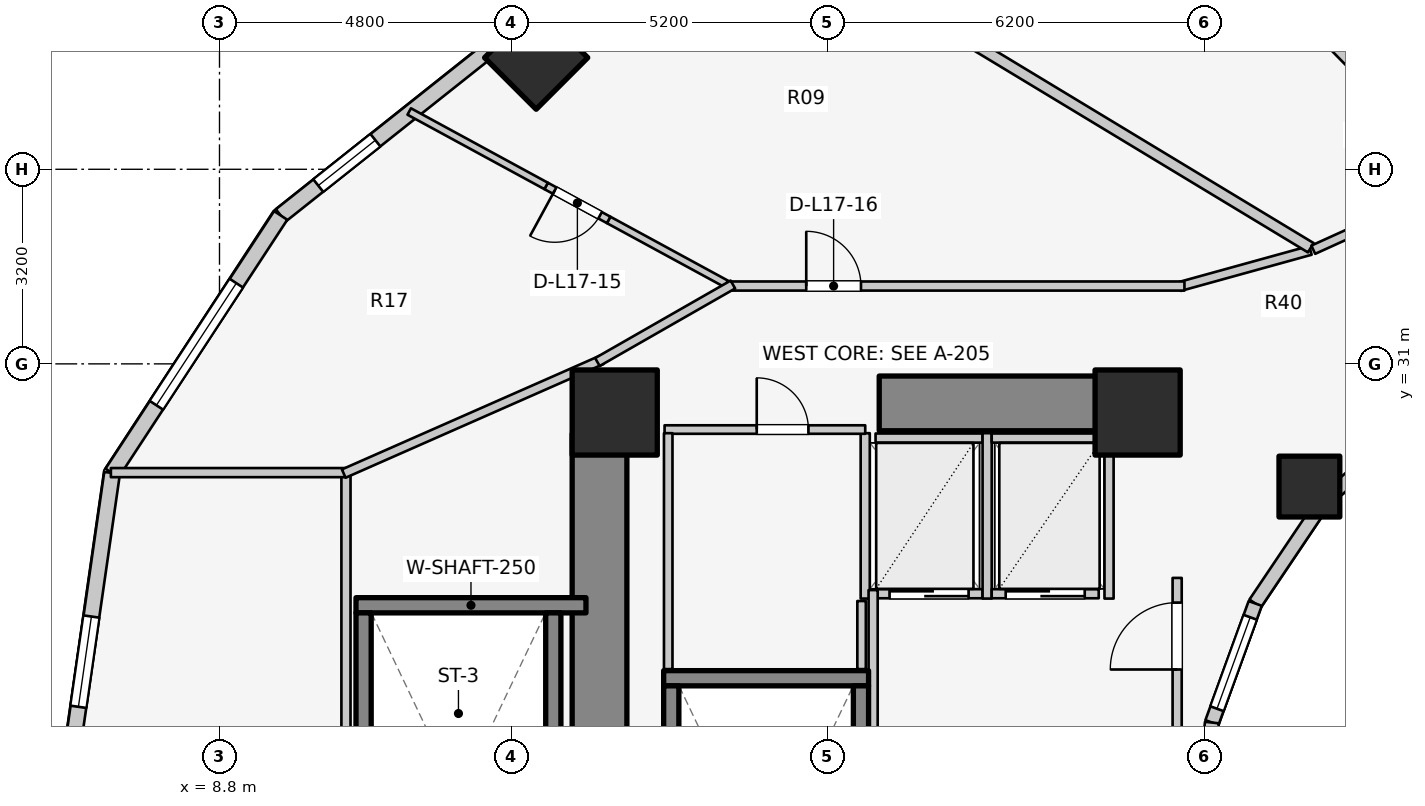
"""IFC4 building model, lengths in metres.
Left out: names, types, materials, properties, quantities, classifications, styles, units other than length and angle.
Written with IfcOpenShell. Run it as: python <this file> out.ifc"""

import sys

from ifc_helpers import new_model, si_unit, direction, frame, frame_2d, origin, origin_2d, place, context, subcontext, project, spatial, rectangle, extrude, element, fill, save


model = new_model("IFC4")
c1 = context("Model", 3, precision=1e-05, world=origin(), true_north=direction((0.0, 1.0)))
c2 = subcontext(c1, "Body", "Model", "MODEL_VIEW")
j1 = project(units=[si_unit("LENGTHUNIT", "METRE"), si_unit("PLANEANGLEUNIT", "RADIAN")], contexts=[c1])
p1 = place(None, origin())
s1 = spatial("IfcSite", under=j1, at=p1, CompositionType="ELEMENT")
p2 = place(p1, origin())
s2 = spatial("IfcBuilding", under=s1, at=p2, CompositionType="ELEMENT")
p3 = place(p2, frame((0.0, 0.0, 58.6)))
s3 = spatial("IfcBuildingStorey", under=s2, at=p3, CompositionType="ELEMENT", Elevation=58.6)
p4 = place(p3, frame((15.05, 17.05, 0.0), z_axis=(0.0, 0.0, 1.0), x_axis=(0.0, 1.0, 0.0)))
e1 = element("IfcWall", 1, at=p4, inside=s3, PredefinedType="SHEAR", context=c2, shape_type="SweptSolid", body=[
    extrude(rectangle(XDim=12.8, YDim=0.9, at=frame_2d((6.4, 0.0))), origin(), (0.0, 0.0, 1.0), 3.1),
])
p5 = place(p3, frame((19.65, 30.35, 0.0), z_axis=(0.0, 0.0, 1.0), x_axis=(1.0, 0.0, 0.0)))
e2 = element("IfcWall", 2, at=p5, inside=s3, PredefinedType="SHEAR", context=c2, shape_type="SweptSolid", body=[
    extrude(rectangle(XDim=4.5, YDim=0.9, at=frame_2d((2.25, 0.0))), origin(), (0.0, 0.0, 1.0), 3.1),
])
p6 = place(p3, frame((16.105, 25.83, 0.0), z_axis=(0.0, 0.0, 1.0), x_axis=(1.0, 0.0, 0.0)))
e3 = element("IfcWall", 3, at=p6, inside=s3, PredefinedType="SOLIDWALL", context=c2, shape_type="SweptSolid", body=[
    extrude(rectangle(XDim=3.37, YDim=0.25, at=frame_2d((1.685, 0.0))), origin(), (0.0, 0.0, 1.0), 3.1),
])
for number, where, z_axis, x_axis in (
    (4, (16.23, 17.895, 0.0), (0.0, 0.0, 1.0), (0.0, 1.0, 0.0)),
    (5, (19.35, 17.895, 0.0), (0.0, 0.0, 1.0), (0.0, 1.0, 0.0)),
):
    element("IfcWall", number, at=place(p3, frame(where, z_axis=z_axis, x_axis=x_axis)), inside=s3, PredefinedType="SOLIDWALL", context=c2, shape_type="SweptSolid", body=[
        extrude(rectangle(XDim=7.81, YDim=0.25, at=frame_2d((3.905, 0.0))), origin(), (0.0, 0.0, 1.0), 3.1),
    ])
p7 = place(p3, frame((11.045, 27.03, 0.0), z_axis=(0.0, 0.0, 1.0), x_axis=(1.0, 0.0, 0.0)))
e6 = element("IfcWall", 6, at=p7, inside=s3, PredefinedType="SOLIDWALL", context=c2, shape_type="SweptSolid", body=[
    extrude(rectangle(XDim=3.782, YDim=0.25, at=frame_2d((1.891, 0.0))), origin(), (0.0, 0.0, 1.0), 3.1),
])
for number, where, z_axis, x_axis in (
    (7, (11.17, 19.095, 0.0), (0.0, 0.0, 1.0), (0.0, 1.0, 0.0)),
    (8, (14.29, 19.095, 0.0), (0.0, 0.0, 1.0), (0.0, 1.0, 0.0)),
):
    element("IfcWall", number, at=place(p3, frame(where, z_axis=z_axis, x_axis=x_axis)), inside=s3, PredefinedType="SOLIDWALL", context=c2, shape_type="SweptSolid", body=[
        extrude(rectangle(XDim=7.81, YDim=0.25, at=frame_2d((3.905, 0.0))), origin(), (0.0, 0.0, 1.0), 3.1),
    ])
for number, where, z_axis, x_axis in (
    (9, (23.9, 30.2, 0.0), (0.0, 0.0, 1.0), (1.0, 0.0, 0.0)),
    (10, (15.3, 30.2, 0.0), (0.0, 0.0, 1.0), (1.0, 0.0, 0.0)),
):
    element("IfcColumn", number, at=place(p3, frame(where, z_axis=z_axis, x_axis=x_axis)), inside=s3, PredefinedType="COLUMN", context=c2, shape_type="SweptSolid", body=[
        extrude(rectangle(XDim=1.4, YDim=1.4, at=origin_2d()), origin(), (0.0, 0.0, 1.0), 3.1),
    ])
p8 = place(p3, frame((26.725, 28.982, 0.0), z_axis=(0.0, 0.0, 1.0), x_axis=(1.0, 0.0, 0.0)))
e11 = element("IfcColumn", 11, at=p8, inside=s3, PredefinedType="COLUMN", context=c2, shape_type="SweptSolid", body=[
    extrude(rectangle(XDim=1.0, YDim=1.0, at=origin_2d()), origin(), (0.0, 0.0, 1.0), 3.1),
])
p9 = place(p3, frame((14.008, 36.035, 0.0), z_axis=(0.0, 0.0, 1.0), x_axis=(-0.707106781187, 0.707106781187, 0.0)))
e12 = element("IfcColumn", 12, at=p9, inside=s3, PredefinedType="COLUMN", context=c2, shape_type="SweptSolid", body=[
    extrude(rectangle(XDim=1.2, YDim=1.2, at=origin_2d()), origin(), (0.0, 0.0, 1.0), 3.1),
])
p10 = place(p3, frame((28.44, 30.032, 0.0), z_axis=(0.0, 0.0, 1.0), x_axis=(-0.752576694707, -0.658504607869, 0.0)))
e13 = element("IfcWall", 13, at=p10, inside=s3, PredefinedType="STANDARD", context=c2, shape_type="SweptSolid", body=[
    extrude(rectangle(XDim=1.959, YDim=0.23, at=frame_2d((0.98, 0.0))), origin(), (0.0, 0.0, 1.0), 2.16),
])
p11 = place(p3, frame((26.965, 28.742, 0.0), z_axis=(0.0, 0.0, 1.0), x_axis=(-0.558197800898, -0.829707909492, 0.0)))
e14 = element("IfcWall", 14, at=p11, inside=s3, PredefinedType="STANDARD", context=c2, shape_type="SweptSolid", body=[
    extrude(rectangle(XDim=2.027, YDim=0.23, at=frame_2d((1.013, 0.0))), origin(), (0.0, 0.0, 1.0), 2.16),
])
p12 = place(p3, frame((25.834, 27.06, 0.0), z_axis=(0.0, 0.0, 1.0), x_axis=(-0.341423187295, -0.93990968033, 0.0)))
e15 = element("IfcWall", 15, at=p12, inside=s3, PredefinedType="STANDARD", context=c2, shape_type="SweptSolid", body=[
    extrude(rectangle(XDim=2.084, YDim=0.23, at=frame_2d((1.042, 0.0))), origin(), (0.0, 0.0, 1.0), 2.84),
])
p13 = place(p12, frame((0.242, 0.0, 0.85)))
e16 = element("IfcOpeningElement", 16, at=p13, cuts=e15, PredefinedType="OPENING", context=c2, shape_type="SweptSolid", body=[
    extrude(rectangle(XDim=1.6, YDim=1.65, at=frame_2d((0.8, 0.825))), frame((0.0, 0.125, 0.0), z_axis=(0.0, -1.0, 0.0), x_axis=(1.0, 0.0, 0.0)), (0.0, 0.0, 1.0), 0.25),
])
p14 = place(p3, frame((25.123, 25.102, 0.0), z_axis=(0.0, 0.0, 1.0), x_axis=(-0.114711713601, -0.993398823617, 0.0)))
e17 = element("IfcWall", 17, at=p14, inside=s3, PredefinedType="STANDARD", context=c2, shape_type="SweptSolid", body=[
    extrude(rectangle(XDim=2.115, YDim=0.23, at=frame_2d((1.058, 0.0))), origin(), (0.0, 0.0, 1.0), 2.84),
])
p15 = place(p3, frame((13.595, 36.45, 0.0), z_axis=(0.0, 0.0, 1.0), x_axis=(-0.783123133379, -0.621866672179, 0.0)))
e18 = element("IfcWall", 18, at=p15, inside=s3, PredefinedType="STANDARD", context=c2, shape_type="SweptSolid", body=[
    extrude(rectangle(XDim=4.839, YDim=0.26, at=frame_2d((2.419, 0.0))), origin(), (0.0, 0.0, 1.0), 2.85),
])
p16 = place(p15, frame((2.849, 0.0, 0.75)))
e19 = element("IfcOpeningElement", 19, at=p16, cuts=e18, PredefinedType="OPENING", context=c2, shape_type="SweptSolid", body=[
    extrude(rectangle(XDim=1.2, YDim=1.5, at=frame_2d((0.6, 0.75))), frame((0.0, 0.14, 0.0), z_axis=(0.0, -1.0, 0.0), x_axis=(1.0, 0.0, 0.0)), (0.0, 0.0, 1.0), 0.28),
])
p17 = place(p3, frame((9.806, 33.441, 0.0), z_axis=(0.0, 0.0, 1.0), x_axis=(-0.547702757047, -0.836672988642, 0.0)))
e20 = element("IfcWall", 20, at=p17, inside=s3, PredefinedType="STANDARD", context=c2, shape_type="SweptSolid", body=[
    extrude(rectangle(XDim=5.062, YDim=0.26, at=frame_2d((2.531, 0.0))), origin(), (0.0, 0.0, 1.0), 2.85),
])
p18 = place(p17, frame((1.331, 0.0, 0.75)))
e21 = element("IfcOpeningElement", 21, at=p18, cuts=e20, PredefinedType="OPENING", context=c2, shape_type="SweptSolid", body=[
    extrude(rectangle(XDim=2.4, YDim=1.7, at=frame_2d((1.2, 0.85))), frame((0.0, 0.14, 0.0), z_axis=(0.0, -1.0, 0.0), x_axis=(1.0, 0.0, 0.0)), (0.0, 0.0, 1.0), 0.28),
])
p19 = place(p3, frame((7.033, 29.205, 0.0), z_axis=(0.0, 0.0, 1.0), x_axis=(-0.142528001686, -0.989790770181, 0.0)))
e22 = element("IfcWall", 22, at=p19, inside=s3, PredefinedType="STANDARD", context=c2, shape_type="SweptSolid", body=[
    extrude(rectangle(XDim=6.269, YDim=0.26, at=frame_2d((3.135, 0.0))), origin(), (0.0, 0.0, 1.0), 2.85),
])
p20 = place(p19, frame((2.385, 0.0, 0.75)))
e23 = element("IfcOpeningElement", 23, at=p20, cuts=e22, PredefinedType="OPENING", context=c2, shape_type="SweptSolid", body=[
    extrude(rectangle(XDim=1.5, YDim=1.6, at=frame_2d((0.75, 0.8))), frame((0.0, 0.14, 0.0), z_axis=(0.0, -1.0, 0.0), x_axis=(1.0, 0.0, 0.0)), (0.0, 0.0, 1.0), 0.28),
])
p21 = place(p3, frame((19.59, 27.22, 0.0), z_axis=(0.0, 0.0, 1.0), x_axis=(1.0, 0.0, 0.0)))
e24 = element("IfcWall", 24, at=p21, inside=s3, PredefinedType="SOLIDWALL", context=c2, shape_type="SweptSolid", body=[
    extrude(rectangle(XDim=1.76, YDim=0.15, at=frame_2d((0.88, 0.0))), origin(), (0.0, 0.0, 1.0), 2.855),
])
p22 = place(p21, frame((0.23, 0.0, 0.0)))
e25 = element("IfcOpeningElement", 25, at=p22, cuts=e24, PredefinedType="OPENING", context=c2, shape_type="SweptSolid", body=[
    extrude(rectangle(XDim=1.3, YDim=2.1, at=frame_2d((0.65, 1.05))), frame((0.0, 0.085, 0.0), z_axis=(0.0, -1.0, 0.0), x_axis=(1.0, 0.0, 0.0)), (0.0, 0.0, 1.0), 0.17),
])
p23 = place(p3, frame((19.59, 29.78, 0.0), z_axis=(0.0, 0.0, 1.0), x_axis=(1.0, 0.0, 0.0)))
e26 = element("IfcWall", 26, at=p23, inside=s3, PredefinedType="SOLIDWALL", context=c2, shape_type="SweptSolid", body=[
    extrude(rectangle(XDim=1.76, YDim=0.15, at=frame_2d((0.88, 0.0))), origin(), (0.0, 0.0, 1.0), 2.855),
])
for number, where, z_axis, x_axis in (
    (27, (19.42, 27.14, 0.0), (0.0, 0.0, 1.0), (0.0, 1.0, 0.0)),
    (28, (21.425, 27.14, 0.0), (0.0, 0.0, 1.0), (0.0, 1.0, 0.0)),
):
    element("IfcWall", number, at=place(p3, frame(where, z_axis=z_axis, x_axis=x_axis)), inside=s3, PredefinedType="SOLIDWALL", context=c2, shape_type="SweptSolid", body=[
        extrude(rectangle(XDim=2.72, YDim=0.15, at=frame_2d((1.36, 0.0))), origin(), (0.0, 0.0, 1.0), 2.855),
    ])
p24 = place(p3, frame((21.5, 27.22, 0.0), z_axis=(0.0, 0.0, 1.0), x_axis=(1.0, 0.0, 0.0)))
e29 = element("IfcWall", 29, at=p24, inside=s3, PredefinedType="SOLIDWALL", context=c2, shape_type="SweptSolid", body=[
    extrude(rectangle(XDim=1.76, YDim=0.15, at=frame_2d((0.88, 0.0))), origin(), (0.0, 0.0, 1.0), 2.855),
])
p25 = place(p24, frame((0.23, 0.0, 0.0)))
e30 = element("IfcOpeningElement", 30, at=p25, cuts=e29, PredefinedType="OPENING", context=c2, shape_type="SweptSolid", body=[
    extrude(rectangle(XDim=1.3, YDim=2.1, at=frame_2d((0.65, 1.05))), frame((0.0, 0.085, 0.0), z_axis=(0.0, -1.0, 0.0), x_axis=(1.0, 0.0, 0.0)), (0.0, 0.0, 1.0), 0.17),
])
p26 = place(p3, frame((21.5, 29.78, 0.0), z_axis=(0.0, 0.0, 1.0), x_axis=(1.0, 0.0, 0.0)))
e31 = element("IfcWall", 31, at=p26, inside=s3, PredefinedType="SOLIDWALL", context=c2, shape_type="SweptSolid", body=[
    extrude(rectangle(XDim=1.76, YDim=0.15, at=frame_2d((0.88, 0.0))), origin(), (0.0, 0.0, 1.0), 2.855),
])
p27 = place(p3, frame((23.43, 27.14, 0.0), z_axis=(0.0, 0.0, 1.0), x_axis=(0.0, 1.0, 0.0)))
e32 = element("IfcWall", 32, at=p27, inside=s3, PredefinedType="SOLIDWALL", context=c2, shape_type="SweptSolid", body=[
    extrude(rectangle(XDim=2.72, YDim=0.15, at=frame_2d((1.36, 0.0))), origin(), (0.0, 0.0, 1.0), 2.855),
])
p28 = place(p3, frame((19.55, 24.08, 0.0), z_axis=(0.0, 0.0, 1.0), x_axis=(0.0, 1.0, 0.0)))
e33 = element("IfcWall", 33, at=p28, inside=s3, PredefinedType="PARTITIONING", context=c2, shape_type="SweptSolid", body=[
    extrude(rectangle(XDim=3.2, YDim=0.15, at=frame_2d((1.6, 0.0))), origin(), (0.0, 0.0, 1.0), 2.855),
])
p29 = place(p3, frame((24.55, 24.08, 0.0), z_axis=(0.0, 0.0, 1.0), x_axis=(0.0, 1.0, 0.0)))
e34 = element("IfcWall", 34, at=p29, inside=s3, PredefinedType="PARTITIONING", context=c2, shape_type="SweptSolid", body=[
    extrude(rectangle(XDim=3.4, YDim=0.15, at=frame_2d((1.7, 0.0))), origin(), (0.0, 0.0, 1.0), 2.855),
])
p30 = place(p29, frame((1.894, 0.0, 0.0)))
e35 = element("IfcOpeningElement", 35, at=p30, cuts=e34, PredefinedType="OPENING", context=c2, shape_type="SweptSolid", body=[
    extrude(rectangle(XDim=1.1, YDim=2.1, at=frame_2d((0.55, 1.05))), frame((0.0, 0.085, 0.0), z_axis=(0.0, -1.0, 0.0), x_axis=(1.0, 0.0, 0.0)), (0.0, 0.0, 1.0), 0.17),
])
p31 = place(p3, frame((16.12, 29.92, 0.0), z_axis=(0.0, 0.0, 1.0), x_axis=(1.0, 0.0, 0.0)))
e36 = element("IfcWall", 36, at=p31, inside=s3, PredefinedType="PLUMBINGWALL", context=c2, shape_type="SweptSolid", body=[
    extrude(rectangle(XDim=3.3, YDim=0.14, at=frame_2d((1.65, 0.0))), origin(), (0.0, 0.0, 1.0), 2.855),
])
p32 = place(p31, frame((1.516, 0.0, 0.0)))
e37 = element("IfcOpeningElement", 37, at=p32, cuts=e36, PredefinedType="OPENING", context=c2, shape_type="SweptSolid", body=[
    extrude(rectangle(XDim=0.85, YDim=2.05, at=frame_2d((0.425, 1.025))), frame((0.0, 0.08, 0.0), z_axis=(0.0, -1.0, 0.0), x_axis=(1.0, 0.0, 0.0)), (0.0, 0.0, 1.0), 0.16),
])
p33 = place(p3, frame((16.18, 25.98, 0.0), z_axis=(0.0, 0.0, 1.0), x_axis=(0.0, 1.0, 0.0)))
e38 = element("IfcWall", 38, at=p33, inside=s3, PredefinedType="PLUMBINGWALL", context=c2, shape_type="SweptSolid", body=[
    extrude(rectangle(XDim=3.88, YDim=0.14, at=frame_2d((1.94, 0.0))), origin(), (0.0, 0.0, 1.0), 2.855),
])
p34 = place(p3, frame((19.36, 25.98, 0.0), z_axis=(0.0, 0.0, 1.0), x_axis=(0.0, 1.0, 0.0)))
e39 = element("IfcWall", 39, at=p34, inside=s3, PredefinedType="PLUMBINGWALL", context=c2, shape_type="SweptSolid", body=[
    extrude(rectangle(XDim=1.12, YDim=0.14, at=frame_2d((0.56, 0.0))), origin(), (0.0, 0.0, 1.0), 2.855),
])
p35 = place(p3, frame((10.88, 16.748, 0.0), z_axis=(0.0, 0.0, 1.0), x_axis=(0.0, 1.0, 0.0)))
e40 = element("IfcWall", 40, at=p35, inside=s3, PredefinedType="PARTITIONING", context=c2, shape_type="SweptSolid", body=[
    extrude(rectangle(XDim=12.503, YDim=0.15, at=frame_2d((6.252, 0.0))), origin(), (0.0, 0.0, 1.0), 2.12),
])
p36 = place(p3, frame((7.014, 29.212, 0.0), z_axis=(0.0, 0.0, 1.0), x_axis=(1.0, 0.0, 0.0)))
e41 = element("IfcWall", 41, at=p36, inside=s3, PredefinedType="PARTITIONING", context=c2, shape_type="SweptSolid", body=[
    extrude(rectangle(XDim=3.866, YDim=0.15, at=frame_2d((1.933, 0.0))), origin(), (0.0, 0.0, 1.0), 2.855),
])
p37 = place(p3, frame((10.844, 29.196, 0.0), z_axis=(0.0, 0.0, 1.0), x_axis=(0.91502756289, 0.403391322604, 0.0)))
e42 = element("IfcWall", 42, at=p37, inside=s3, PredefinedType="PARTITIONING", context=c2, shape_type="SweptSolid", body=[
    extrude(rectangle(XDim=4.637, YDim=0.15, at=frame_2d((2.319, 0.0))), origin(), (0.0, 0.0, 1.0), 2.069),
])
p38 = place(p3, frame((17.244, 32.256, 0.0), z_axis=(0.0, 0.0, 1.0), x_axis=(-0.878580476603, 0.477594332181, 0.0)))
e43 = element("IfcWall", 43, at=p38, inside=s3, PredefinedType="MOVABLE", context=c2, shape_type="SweptSolid", body=[
    extrude(rectangle(XDim=2.326, YDim=0.12, at=frame_2d((1.163, 0.0))), origin(), (0.0, 0.0, 1.0), 2.855),
])
p39 = place(p3, frame((15.2, 33.367, 0.0), z_axis=(0.0, 0.0, 1.0), x_axis=(-0.878540750178, 0.4776674055, 0.0)))
e44 = element("IfcWall", 44, at=p39, inside=s3, PredefinedType="MOVABLE", context=c2, shape_type="SweptSolid", body=[
    extrude(rectangle(XDim=1.17, YDim=0.12, at=frame_2d((0.585, 0.0))), origin(), (0.0, 0.0, 1.0), 2.11),
])
p40 = place(p39, frame((0.16, 0.0, 0.0)))
e45 = element("IfcOpeningElement", 45, at=p40, cuts=e44, PredefinedType="OPENING", context=c2, shape_type="SweptSolid", body=[
    extrude(rectangle(XDim=0.85, YDim=2.05, at=frame_2d((0.425, 1.025))), frame((0.0, 0.07, 0.0), z_axis=(0.0, -1.0, 0.0), x_axis=(1.0, 0.0, 0.0)), (0.0, 0.0, 1.0), 0.14),
])
p41 = place(p3, frame((14.172, 33.926, 0.0), z_axis=(0.0, 0.0, 1.0), x_axis=(-0.878524579981, 0.477697145029, 0.0)))
e46 = element("IfcWall", 46, at=p41, inside=s3, PredefinedType="MOVABLE", context=c2, shape_type="SweptSolid", body=[
    extrude(rectangle(XDim=2.563, YDim=0.12, at=frame_2d((1.281, 0.0))), origin(), (0.0, 0.0, 1.0), 2.069),
])
p42 = place(p3, frame((26.742, 32.867, 0.0), z_axis=(0.0, 0.0, 1.0), x_axis=(-0.963833843713, -0.266503886865, 0.0)))
e47 = element("IfcWall", 47, at=p42, inside=s3, PredefinedType="PARTITIONING", context=c2, shape_type="SweptSolid", body=[
    extrude(rectangle(XDim=2.232, YDim=0.15, at=frame_2d((1.116, 0.0))), origin(), (0.0, 0.0, 1.0), 2.237),
])
p43 = place(p3, frame((17.15, 32.28, 0.0), z_axis=(0.0, 0.0, 1.0), x_axis=(1.0, 0.0, 0.0)))
e48 = element("IfcWall", 48, at=p43, inside=s3, PredefinedType="PARTITIONING", context=c2, shape_type="SweptSolid", body=[
    extrude(rectangle(XDim=7.52, YDim=0.15, at=frame_2d((3.76, 0.0))), origin(), (0.0, 0.0, 1.0), 2.237),
])
p44 = place(p43, frame((1.3, 0.0, 0.0)))
e49 = element("IfcOpeningElement", 49, at=p44, cuts=e48, PredefinedType="OPENING", context=c2, shape_type="SweptSolid", body=[
    extrude(rectangle(XDim=0.9, YDim=2.1, at=frame_2d((0.45, 1.05))), frame((0.0, 0.085, 0.0), z_axis=(0.0, -1.0, 0.0), x_axis=(1.0, 0.0, 0.0)), (0.0, 0.0, 1.0), 0.17),
])
p45 = place(p3, frame((17.243, 32.305, 0.0), z_axis=(0.0, 0.0, 1.0), x_axis=(-0.867991349648, -0.496579315857, 0.0)))
e50 = element("IfcWall", 50, at=p45, inside=s3, PredefinedType="PARTITIONING", context=c2, shape_type="SweptSolid", body=[
    extrude(rectangle(XDim=2.567, YDim=0.15, at=frame_2d((1.283, 0.0))), origin(), (0.0, 0.0, 1.0), 2.069),
])
p46 = place(p3, frame((29.267, 34.061, 0.0), z_axis=(0.0, 0.0, 1.0), x_axis=(-0.700234780085, 0.713912636644, 0.0)))
e51 = element("IfcWall", 51, at=p46, inside=s3, PredefinedType="PARTITIONING", context=c2, shape_type="SweptSolid", body=[
    extrude(rectangle(XDim=7.515, YDim=0.18, at=frame_2d((3.757, 0.0))), origin(), (0.0, 0.0, 1.0), 2.237),
])
p47 = place(p3, frame((26.748, 32.91, 0.0), z_axis=(0.0, 0.0, 1.0), x_axis=(-0.855817136021, 0.517278483694, 0.0)))
e52 = element("IfcWall", 52, at=p47, inside=s3, PredefinedType="PARTITIONING", context=c2, shape_type="SweptSolid", body=[
    extrude(rectangle(XDim=9.564, YDim=0.18, at=frame_2d((4.782, 0.0))), origin(), (0.0, 0.0, 1.0), 2.237),
])
p48 = place(p3, frame((29.313, 34.023, 0.0), z_axis=(0.0, 0.0, 1.0), x_axis=(-0.910568469686, -0.41335827319, 0.0)))
e53 = element("IfcWall", 53, at=p48, inside=s3, PredefinedType="PARTITIONING", context=c2, shape_type="SweptSolid", body=[
    extrude(rectangle(XDim=2.772, YDim=0.15, at=frame_2d((1.386, 0.0))), origin(), (0.0, 0.0, 1.0), 2.237),
])
p49 = place(p48, frame((0.911, 0.0, 0.0)))
e54 = element("IfcOpeningElement", 54, at=p49, cuts=e53, PredefinedType="OPENING", context=c2, shape_type="SweptSolid", body=[
    extrude(rectangle(XDim=0.95, YDim=2.1, at=frame_2d((0.475, 1.05))), frame((0.0, 0.085, 0.0), z_axis=(0.0, -1.0, 0.0), x_axis=(1.0, 0.0, 0.0)), (0.0, 0.0, 1.0), 0.17),
])
p50 = place(p13, origin())
e55 = element("IfcWindow", 55, at=p50, inside=s3, PartitioningType="SINGLE_PANEL", PredefinedType="WINDOW", context=c2, shape_type="SweptSolid", body=[
    extrude(rectangle(XDim=1.6, YDim=1.65, at=frame_2d((0.8, 0.825))), frame((0.0, 0.03, 0.0), z_axis=(0.0, -1.0, 0.0), x_axis=(1.0, 0.0, 0.0)), (0.0, 0.0, 1.0), 0.06),
])
fill(e16, e55)
p51 = place(p16, origin())
e56 = element("IfcWindow", 56, at=p51, inside=s3, PartitioningType="SINGLE_PANEL", PredefinedType="WINDOW", context=c2, shape_type="SweptSolid", body=[
    extrude(rectangle(XDim=1.2, YDim=1.5, at=frame_2d((0.6, 0.75))), frame((0.0, 0.03, 0.0), z_axis=(0.0, -1.0, 0.0), x_axis=(1.0, 0.0, 0.0)), (0.0, 0.0, 1.0), 0.06),
])
fill(e19, e56)
p52 = place(p18, origin())
e57 = element("IfcWindow", 57, at=p52, inside=s3, PartitioningType="SINGLE_PANEL", PredefinedType="WINDOW", context=c2, shape_type="SweptSolid", body=[
    extrude(rectangle(XDim=2.4, YDim=1.7, at=frame_2d((1.2, 0.85))), frame((0.0, 0.03, 0.0), z_axis=(0.0, -1.0, 0.0), x_axis=(1.0, 0.0, 0.0)), (0.0, 0.0, 1.0), 0.06),
])
fill(e21, e57)
p53 = place(p20, origin())
e58 = element("IfcWindow", 58, at=p53, inside=s3, PartitioningType="SINGLE_PANEL", PredefinedType="WINDOW", context=c2, shape_type="SweptSolid", body=[
    extrude(rectangle(XDim=1.5, YDim=1.6, at=frame_2d((0.75, 0.8))), frame((0.0, 0.03, 0.0), z_axis=(0.0, -1.0, 0.0), x_axis=(1.0, 0.0, 0.0)), (0.0, 0.0, 1.0), 0.06),
])
fill(e23, e58)
p54 = place(p22, origin())
e59 = element("IfcDoor", 59, at=p54, inside=s3, OperationType="DOUBLE_DOOR_SLIDING", PredefinedType="DOOR", context=c2, shape_type="SweptSolid", body=[
    extrude(rectangle(XDim=1.3, YDim=2.1, at=frame_2d((0.65, 1.05))), frame((0.0, 0.025, 0.0), z_axis=(0.0, -1.0, 0.0), x_axis=(1.0, 0.0, 0.0)), (0.0, 0.0, 1.0), 0.05),
])
fill(e25, e59)
p55 = place(p25, origin())
e60 = element("IfcDoor", 60, at=p55, inside=s3, OperationType="DOUBLE_DOOR_SLIDING", PredefinedType="DOOR", context=c2, shape_type="SweptSolid", body=[
    extrude(rectangle(XDim=1.3, YDim=2.1, at=frame_2d((0.65, 1.05))), frame((0.0, 0.025, 0.0), z_axis=(0.0, -1.0, 0.0), x_axis=(1.0, 0.0, 0.0)), (0.0, 0.0, 1.0), 0.05),
])
fill(e30, e60)
p56 = place(p30, origin())
e61 = element("IfcDoor", 61, at=p56, inside=s3, OperationType="SINGLE_SWING_LEFT", PredefinedType="DOOR", context=c2, shape_type="SweptSolid", body=[
    extrude(rectangle(XDim=1.1, YDim=2.1, at=frame_2d((0.55, 1.05))), frame((0.0, 0.025, 0.0), z_axis=(0.0, -1.0, 0.0), x_axis=(1.0, 0.0, 0.0)), (0.0, 0.0, 1.0), 0.05),
])
fill(e35, e61)
p57 = place(p32, origin())
e62 = element("IfcDoor", 62, at=p57, inside=s3, OperationType="SINGLE_SWING_LEFT", PredefinedType="DOOR", context=c2, shape_type="SweptSolid", body=[
    extrude(rectangle(XDim=0.85, YDim=2.05, at=frame_2d((0.425, 1.025))), frame((0.0, 0.025, 0.0), z_axis=(0.0, -1.0, 0.0), x_axis=(1.0, 0.0, 0.0)), (0.0, 0.0, 1.0), 0.05),
])
fill(e37, e62)
p58 = place(p40, origin())
e63 = element("IfcDoor", 63, at=p58, inside=s3, OperationType="SINGLE_SWING_RIGHT", PredefinedType="DOOR", context=c2, shape_type="SweptSolid", body=[
    extrude(rectangle(XDim=0.85, YDim=2.05, at=frame_2d((0.425, 1.025))), frame((0.0, 0.025, 0.0), z_axis=(0.0, -1.0, 0.0), x_axis=(1.0, 0.0, 0.0)), (0.0, 0.0, 1.0), 0.05),
])
fill(e45, e63)
p59 = place(p44, origin())
e64 = element("IfcDoor", 64, at=p59, inside=s3, OperationType="SINGLE_SWING_LEFT", PredefinedType="DOOR", context=c2, shape_type="SweptSolid", body=[
    extrude(rectangle(XDim=0.9, YDim=2.1, at=frame_2d((0.45, 1.05))), frame((0.0, 0.025, 0.0), z_axis=(0.0, -1.0, 0.0), x_axis=(1.0, 0.0, 0.0)), (0.0, 0.0, 1.0), 0.05),
])
fill(e49, e64)
save(model, sys.argv[1])
